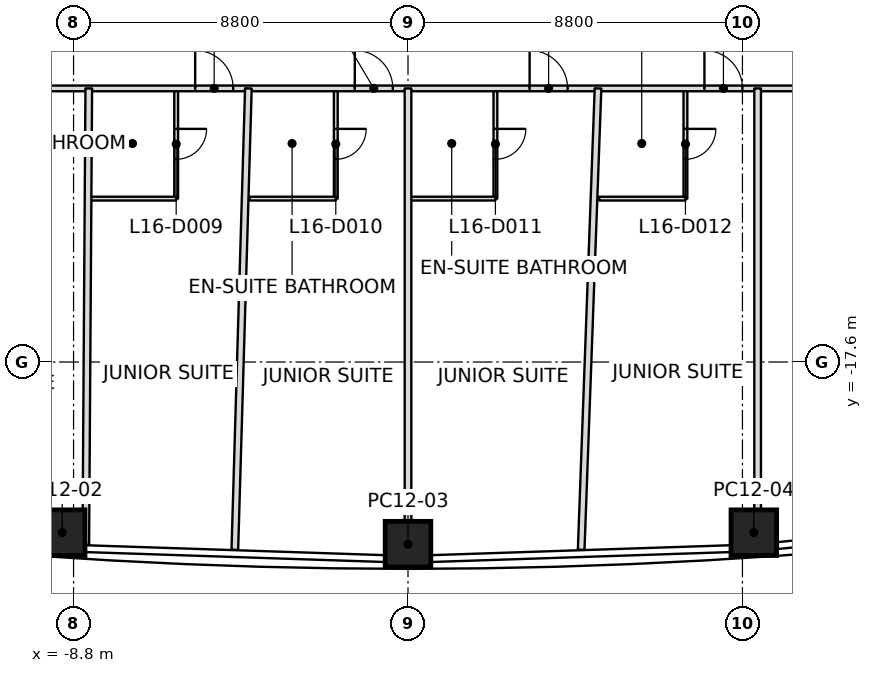
"""IFC4 building model, lengths in metres.
Left out: names, types, materials, properties, quantities, classifications, styles, units other than length and angle.
Written with IfcOpenShell. Run it as: python <this file> out.ifc"""

import sys

from ifc_helpers import new_model, si_unit, direction, frame, frame_2d, origin, origin_2d, place, context, subcontext, project, spatial, rectangle, extrude, clip, halfspace, element, fill, save


model = new_model("IFC4")
c1 = context("Model", 3, precision=1e-05, world=origin(), true_north=direction((0.0, 1.0)))
c2 = subcontext(c1, "Body", "Model", "MODEL_VIEW")
j1 = project(units=[si_unit("LENGTHUNIT", "METRE"), si_unit("PLANEANGLEUNIT", "RADIAN")], contexts=[c1])
p1 = place(None, origin())
s1 = spatial("IfcSite", under=j1, at=p1, CompositionType="ELEMENT")
p2 = place(p1, origin())
s2 = spatial("IfcBuilding", under=s1, at=p2, CompositionType="ELEMENT")
p3 = place(p2, frame((0.0, 0.0, 81.3)))
s3 = spatial("IfcBuildingStorey", under=s2, at=p3, CompositionType="ELEMENT", Elevation=81.3)
p4 = place(p3, frame((-9.1, -22.091, 0.0), z_axis=(0.009632635025, 0.012073782257, 0.999880710947), x_axis=(-0.997756100606, 0.066371190404, 0.008810720082)))
e1 = element("IfcColumn", 1, at=p4, inside=s3, PredefinedType="COLUMN", context=c2, shape_type="SweptSolid", body=[
    clip(extrude(rectangle(XDim=1.2, YDim=1.2, at=origin_2d()), origin(), (0.0, 0.0, 1.0), 3.7), halfspace(frame((0.0, 0.0, 0.009)), True)),
])
p5 = place(p3, frame((0.0, -22.393, 0.0), z_axis=(0.0, 0.012338222751, 0.999923881233), x_axis=(1.0, 0.0, 0.0)))
e2 = element("IfcColumn", 2, at=p5, inside=s3, PredefinedType="COLUMN", context=c2, shape_type="SweptSolid", body=[
    clip(extrude(rectangle(XDim=1.2, YDim=1.2, at=origin_2d()), origin(), (0.0, 0.0, 1.0), 3.7), halfspace(frame((0.0, 0.0, 0.01)), True)),
])
p6 = place(p3, frame((9.1, -22.091, 0.0), z_axis=(-0.009632635025, 0.012073782257, 0.999880710947), x_axis=(0.997756100606, 0.066371190404, 0.008810720082)))
e3 = element("IfcColumn", 3, at=p6, inside=s3, PredefinedType="COLUMN", context=c2, shape_type="SweptSolid", body=[
    clip(extrude(rectangle(XDim=1.2, YDim=1.2, at=origin_2d()), origin(), (0.0, 0.0, 1.0), 3.7), halfspace(frame((0.0, 0.0, 0.009)), True)),
])
p7 = place(p3, frame((-8.4, -10.4, 0.0), z_axis=(0.0, 0.0, 1.0), x_axis=(-0.006564899179, -0.999978450817, 0.0)))
e4 = element("IfcWall", 4, at=p7, inside=s3, PredefinedType="PARTITIONING", context=c2, shape_type="SweptSolid", body=[
    extrude(rectangle(XDim=12.012, YDim=0.175, at=frame_2d((6.006, 0.0))), origin(), (0.0, 0.0, 1.0), 2.934),
])
p8 = place(p3, frame((-4.2, -10.4, 0.0), z_axis=(0.0, 0.0, 1.0), x_axis=(-0.029364204568, -0.999568778769, 0.0)))
e5 = element("IfcWall", 5, at=p8, inside=s3, PredefinedType="PARTITIONING", context=c2, shape_type="SweptSolid", body=[
    extrude(rectangle(XDim=12.147, YDim=0.175, at=frame_2d((6.073, 0.0))), origin(), (0.0, 0.0, 1.0), 2.934),
])
p9 = place(p3, frame((0.0, -10.4, 0.0), z_axis=(0.0, 0.0, 1.0), x_axis=(0.0, -1.0, 0.0)))
e6 = element("IfcWall", 6, at=p9, inside=s3, PredefinedType="PARTITIONING", context=c2, shape_type="SweptSolid", body=[
    extrude(rectangle(XDim=12.523, YDim=0.175, at=frame_2d((6.261, 0.0))), origin(), (0.0, 0.0, 1.0), 3.15),
])
p10 = place(p3, frame((5.0, -10.4, 0.0), z_axis=(0.0, 0.0, 1.0), x_axis=(-0.036490670833, -0.999333993689, 0.0)))
e7 = element("IfcWall", 7, at=p10, inside=s3, PredefinedType="PARTITIONING", context=c2, shape_type="SweptSolid", body=[
    extrude(rectangle(XDim=12.15, YDim=0.175, at=frame_2d((6.075, 0.0))), origin(), (0.0, 0.0, 1.0), 2.934),
])
p11 = place(p3, frame((9.2, -10.4, 0.0), z_axis=(0.0, 0.0, 1.0), x_axis=(0.0, -1.0, 0.0)))
e8 = element("IfcWall", 8, at=p11, inside=s3, PredefinedType="PARTITIONING", context=c2, shape_type="SweptSolid", body=[
    extrude(rectangle(XDim=12.213, YDim=0.175, at=frame_2d((6.106, 0.0))), origin(), (0.0, 0.0, 1.0), 3.15),
])
p12 = place(p3, frame((-13.32, -10.4, 0.0), z_axis=(0.0, 0.0, 1.0), x_axis=(1.0, 0.0, 0.0)))
e9 = element("IfcWall", 9, at=p12, inside=s3, PredefinedType="PARTITIONING", context=c2, shape_type="SweptSolid", body=[
    extrude(rectangle(XDim=26.64, YDim=0.15, at=frame_2d((13.32, 0.0))), origin(), (0.0, 0.0, 1.0), 2.947),
])
p13 = place(p12, frame((7.72, 0.0, 0.0)))
e10 = element("IfcOpeningElement", 10, at=p13, cuts=e9, PredefinedType="OPENING", context=c2, shape_type="SweptSolid", body=[
    extrude(rectangle(XDim=1.0, YDim=2.1, at=frame_2d((0.5, 1.05))), frame((0.0, 0.075, 0.0), z_axis=(0.0, -1.0, 0.0), x_axis=(1.0, 0.0, 0.0)), (0.0, 0.0, 1.0), 0.15),
])
p14 = place(p12, frame((11.92, 0.0, 0.0)))
e11 = element("IfcOpeningElement", 11, at=p14, cuts=e9, PredefinedType="OPENING", context=c2, shape_type="SweptSolid", body=[
    extrude(rectangle(XDim=1.0, YDim=2.1, at=frame_2d((0.5, 1.05))), frame((0.0, 0.075, 0.0), z_axis=(0.0, -1.0, 0.0), x_axis=(1.0, 0.0, 0.0)), (0.0, 0.0, 1.0), 0.15),
])
p15 = place(p12, frame((16.52, 0.0, 0.0)))
e12 = element("IfcOpeningElement", 12, at=p15, cuts=e9, PredefinedType="OPENING", context=c2, shape_type="SweptSolid", body=[
    extrude(rectangle(XDim=1.0, YDim=2.1, at=frame_2d((0.5, 1.05))), frame((0.0, 0.075, 0.0), z_axis=(0.0, -1.0, 0.0), x_axis=(1.0, 0.0, 0.0)), (0.0, 0.0, 1.0), 0.15),
])
p16 = place(p12, frame((21.12, 0.0, 0.0)))
e13 = element("IfcOpeningElement", 13, at=p16, cuts=e9, PredefinedType="OPENING", context=c2, shape_type="SweptSolid", body=[
    extrude(rectangle(XDim=1.0, YDim=2.1, at=frame_2d((0.5, 1.05))), frame((0.0, 0.075, 0.0), z_axis=(0.0, -1.0, 0.0), x_axis=(1.0, 0.0, 0.0)), (0.0, 0.0, 1.0), 0.15),
])
p17 = place(p3, frame((-6.1, -10.43, 0.0), z_axis=(0.0, 0.0, 1.0), x_axis=(0.0, -1.0, 0.0)))
e14 = element("IfcWall", 14, at=p17, inside=s3, PredefinedType="PARTITIONING", context=c2, shape_type="SweptSolid", body=[
    extrude(rectangle(XDim=2.87, YDim=0.1, at=frame_2d((1.435, 0.0))), origin(), (0.0, 0.0, 1.0), 3.15),
])
p18 = place(p17, frame((1.035, 0.0, 0.0)))
e15 = element("IfcOpeningElement", 15, at=p18, cuts=e14, PredefinedType="OPENING", context=c2, shape_type="SweptSolid", body=[
    extrude(rectangle(XDim=0.8, YDim=2.1, at=frame_2d((0.4, 1.05))), frame((0.0, 0.05, 0.0), z_axis=(0.0, -1.0, 0.0), x_axis=(1.0, 0.0, 0.0)), (0.0, 0.0, 1.0), 0.1),
])
p19 = place(p3, frame((-6.1, -13.3, 0.0), z_axis=(0.0, 0.0, 1.0), x_axis=(-1.0, 0.0, 0.0)))
e16 = element("IfcWall", 16, at=p19, inside=s3, PredefinedType="PARTITIONING", context=c2, shape_type="SweptSolid", body=[
    extrude(rectangle(XDim=2.27, YDim=0.1, at=frame_2d((1.135, 0.0))), origin(), (0.0, 0.0, 1.0), 3.15),
])
p20 = place(p3, frame((-1.9, -10.43, 0.0), z_axis=(0.0, 0.0, 1.0), x_axis=(0.0, -1.0, 0.0)))
e17 = element("IfcWall", 17, at=p20, inside=s3, PredefinedType="PARTITIONING", context=c2, shape_type="SweptSolid", body=[
    extrude(rectangle(XDim=2.87, YDim=0.1, at=frame_2d((1.435, 0.0))), origin(), (0.0, 0.0, 1.0), 3.15),
])
p21 = place(p20, frame((1.035, 0.0, 0.0)))
e18 = element("IfcOpeningElement", 18, at=p21, cuts=e17, PredefinedType="OPENING", context=c2, shape_type="SweptSolid", body=[
    extrude(rectangle(XDim=0.8, YDim=2.1, at=frame_2d((0.4, 1.05))), frame((0.0, 0.05, 0.0), z_axis=(0.0, -1.0, 0.0), x_axis=(1.0, 0.0, 0.0)), (0.0, 0.0, 1.0), 0.1),
])
p22 = place(p3, frame((-1.9, -13.3, 0.0), z_axis=(0.0, 0.0, 1.0), x_axis=(-1.0, 0.0, 0.0)))
e19 = element("IfcWall", 19, at=p22, inside=s3, PredefinedType="PARTITIONING", context=c2, shape_type="SweptSolid", body=[
    extrude(rectangle(XDim=2.27, YDim=0.1, at=frame_2d((1.135, 0.0))), origin(), (0.0, 0.0, 1.0), 3.15),
])
p23 = place(p3, frame((2.3, -10.43, 0.0), z_axis=(0.0, 0.0, 1.0), x_axis=(0.0, -1.0, 0.0)))
e20 = element("IfcWall", 20, at=p23, inside=s3, PredefinedType="PARTITIONING", context=c2, shape_type="SweptSolid", body=[
    extrude(rectangle(XDim=2.87, YDim=0.1, at=frame_2d((1.435, 0.0))), origin(), (0.0, 0.0, 1.0), 3.15),
])
p24 = place(p23, frame((1.035, 0.0, 0.0)))
e21 = element("IfcOpeningElement", 21, at=p24, cuts=e20, PredefinedType="OPENING", context=c2, shape_type="SweptSolid", body=[
    extrude(rectangle(XDim=0.8, YDim=2.1, at=frame_2d((0.4, 1.05))), frame((0.0, 0.05, 0.0), z_axis=(0.0, -1.0, 0.0), x_axis=(1.0, 0.0, 0.0)), (0.0, 0.0, 1.0), 0.1),
])
p25 = place(p3, frame((2.3, -13.3, 0.0), z_axis=(0.0, 0.0, 1.0), x_axis=(-1.0, 0.0, 0.0)))
e22 = element("IfcWall", 22, at=p25, inside=s3, PredefinedType="PARTITIONING", context=c2, shape_type="SweptSolid", body=[
    extrude(rectangle(XDim=2.27, YDim=0.1, at=frame_2d((1.135, 0.0))), origin(), (0.0, 0.0, 1.0), 2.947),
])
p26 = place(p3, frame((7.3, -10.43, 0.0), z_axis=(0.0, 0.0, 1.0), x_axis=(0.0, -1.0, 0.0)))
e23 = element("IfcWall", 23, at=p26, inside=s3, PredefinedType="PARTITIONING", context=c2, shape_type="SweptSolid", body=[
    extrude(rectangle(XDim=2.87, YDim=0.1, at=frame_2d((1.435, 0.0))), origin(), (0.0, 0.0, 1.0), 3.15),
])
p27 = place(p26, frame((1.035, 0.0, 0.0)))
e24 = element("IfcOpeningElement", 24, at=p27, cuts=e23, PredefinedType="OPENING", context=c2, shape_type="SweptSolid", body=[
    extrude(rectangle(XDim=0.8, YDim=2.1, at=frame_2d((0.4, 1.05))), frame((0.0, 0.05, 0.0), z_axis=(0.0, -1.0, 0.0), x_axis=(1.0, 0.0, 0.0)), (0.0, 0.0, 1.0), 0.1),
])
p28 = place(p3, frame((7.3, -13.3, 0.0), z_axis=(0.0, 0.0, 1.0), x_axis=(-1.0, 0.0, 0.0)))
e25 = element("IfcWall", 25, at=p28, inside=s3, PredefinedType="PARTITIONING", context=c2, shape_type="SweptSolid", body=[
    extrude(rectangle(XDim=2.27, YDim=0.1, at=frame_2d((1.135, 0.0))), origin(), (0.0, 0.0, 1.0), 3.15),
])
p29 = place(p13, origin())
e26 = element("IfcDoor", 26, at=p29, inside=s3, OperationType="SINGLE_SWING_LEFT", PredefinedType="DOOR", context=c2, shape_type="SweptSolid", body=[
    extrude(rectangle(XDim=1.0, YDim=2.1, at=frame_2d((0.5, 1.05))), frame((0.0, 0.025, 0.0), z_axis=(0.0, -1.0, 0.0), x_axis=(1.0, 0.0, 0.0)), (0.0, 0.0, 1.0), 0.05),
])
fill(e10, e26)
p30 = place(p18, origin())
e27 = element("IfcDoor", 27, at=p30, inside=s3, OperationType="SINGLE_SWING_LEFT", PredefinedType="DOOR", context=c2, shape_type="SweptSolid", body=[
    extrude(rectangle(XDim=0.8, YDim=2.1, at=frame_2d((0.4, 1.05))), frame((0.0, 0.025, 0.0), z_axis=(0.0, -1.0, 0.0), x_axis=(1.0, 0.0, 0.0)), (0.0, 0.0, 1.0), 0.05),
])
fill(e15, e27)
p31 = place(p14, origin())
e28 = element("IfcDoor", 28, at=p31, inside=s3, OperationType="SINGLE_SWING_LEFT", PredefinedType="DOOR", context=c2, shape_type="SweptSolid", body=[
    extrude(rectangle(XDim=1.0, YDim=2.1, at=frame_2d((0.5, 1.05))), frame((0.0, 0.025, 0.0), z_axis=(0.0, -1.0, 0.0), x_axis=(1.0, 0.0, 0.0)), (0.0, 0.0, 1.0), 0.05),
])
fill(e11, e28)
p32 = place(p21, origin())
e29 = element("IfcDoor", 29, at=p32, inside=s3, OperationType="SINGLE_SWING_LEFT", PredefinedType="DOOR", context=c2, shape_type="SweptSolid", body=[
    extrude(rectangle(XDim=0.8, YDim=2.1, at=frame_2d((0.4, 1.05))), frame((0.0, 0.025, 0.0), z_axis=(0.0, -1.0, 0.0), x_axis=(1.0, 0.0, 0.0)), (0.0, 0.0, 1.0), 0.05),
])
fill(e18, e29)
p33 = place(p15, origin())
e30 = element("IfcDoor", 30, at=p33, inside=s3, OperationType="SINGLE_SWING_LEFT", PredefinedType="DOOR", context=c2, shape_type="SweptSolid", body=[
    extrude(rectangle(XDim=1.0, YDim=2.1, at=frame_2d((0.5, 1.05))), frame((0.0, 0.025, 0.0), z_axis=(0.0, -1.0, 0.0), x_axis=(1.0, 0.0, 0.0)), (0.0, 0.0, 1.0), 0.05),
])
fill(e12, e30)
p34 = place(p24, origin())
e31 = element("IfcDoor", 31, at=p34, inside=s3, OperationType="SINGLE_SWING_LEFT", PredefinedType="DOOR", context=c2, shape_type="SweptSolid", body=[
    extrude(rectangle(XDim=0.8, YDim=2.1, at=frame_2d((0.4, 1.05))), frame((0.0, 0.025, 0.0), z_axis=(0.0, -1.0, 0.0), x_axis=(1.0, 0.0, 0.0)), (0.0, 0.0, 1.0), 0.05),
])
fill(e21, e31)
p35 = place(p16, origin())
e32 = element("IfcDoor", 32, at=p35, inside=s3, OperationType="SINGLE_SWING_LEFT", PredefinedType="DOOR", context=c2, shape_type="SweptSolid", body=[
    extrude(rectangle(XDim=1.0, YDim=2.1, at=frame_2d((0.5, 1.05))), frame((0.0, 0.025, 0.0), z_axis=(0.0, -1.0, 0.0), x_axis=(1.0, 0.0, 0.0)), (0.0, 0.0, 1.0), 0.05),
])
fill(e13, e32)
p36 = place(p27, origin())
e33 = element("IfcDoor", 33, at=p36, inside=s3, OperationType="SINGLE_SWING_RIGHT", PredefinedType="DOOR", context=c2, shape_type="SweptSolid", body=[
    extrude(rectangle(XDim=0.8, YDim=2.1, at=frame_2d((0.4, 1.05))), frame((0.0, 0.025, 0.0), z_axis=(0.0, -1.0, 0.0), x_axis=(1.0, 0.0, 0.0)), (0.0, 0.0, 1.0), 0.05),
])
fill(e24, e33)
save(model, sys.argv[1])
